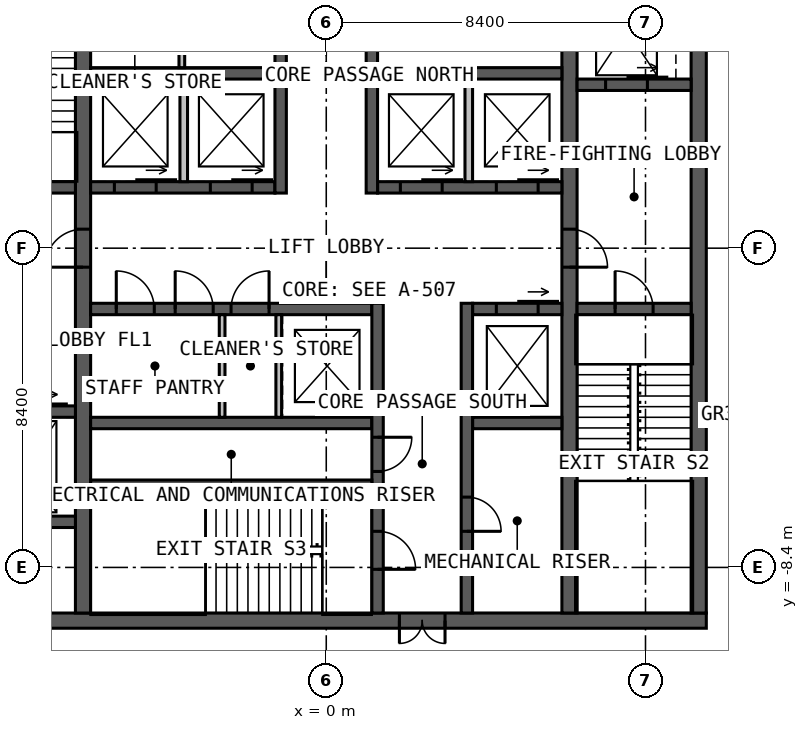
"""IFC4 building model, lengths in metres.
Left out: names, types, materials, properties, quantities, classifications, styles, units other than length and angle.
Written with IfcOpenShell. Run it as: python <this file> out.ifc"""

import sys

from ifc_helpers import new_model, si_unit, direction, frame, frame_2d, origin, place, context, subcontext, project, spatial, rectangle, extrude, element, fill, save


model = new_model("IFC4")
c1 = context("Model", 3, precision=1e-05, world=origin(), true_north=direction((0.0, 1.0)))
c2 = subcontext(c1, "Body", "Model", "MODEL_VIEW")
j1 = project(units=[si_unit("LENGTHUNIT", "METRE"), si_unit("PLANEANGLEUNIT", "RADIAN")], contexts=[c1])
p1 = place(None, origin())
s1 = spatial("IfcSite", under=j1, at=p1, CompositionType="ELEMENT")
p2 = place(p1, origin())
s2 = spatial("IfcBuilding", under=s1, at=p2, CompositionType="ELEMENT")
p3 = place(p2, frame((0.0, 0.0, 264.0)))
s3 = spatial("IfcBuildingStorey", under=s2, at=p3, CompositionType="ELEMENT", Elevation=264.0)
p4 = place(p3, frame((10.0, -9.8, 0.0), z_axis=(0.0, 0.0, 1.0), x_axis=(-1.0, 0.0, 0.0)))
e1 = element("IfcWall", 1, at=p4, inside=s3, PredefinedType="SOLIDWALL", context=c2, shape_type="SweptSolid", body=[
    extrude(rectangle(XDim=20.0, YDim=0.4, at=frame_2d((10.0, 0.0))), origin(), (0.0, 0.0, 1.0), 4.0),
])
p5 = place(p4, frame((6.875, 0.0, 0.0)))
e2 = element("IfcOpeningElement", 2, at=p5, cuts=e1, PredefinedType="OPENING", context=c2, shape_type="SweptSolid", body=[
    extrude(rectangle(XDim=1.2, YDim=2.2, at=frame_2d((0.6, 1.1))), frame((0.0, 0.21, 0.0), z_axis=(0.0, -1.0, 0.0), x_axis=(1.0, 0.0, 0.0)), (0.0, 0.0, 1.0), 0.42),
])
p6 = place(p3, frame((9.8, -9.6, 0.0), z_axis=(0.0, 0.0, 1.0), x_axis=(0.0, 1.0, 0.0)))
e3 = element("IfcWall", 3, at=p6, inside=s3, PredefinedType="SOLIDWALL", context=c2, shape_type="SweptSolid", body=[
    extrude(rectangle(XDim=19.2, YDim=0.4, at=frame_2d((9.6, 0.0))), origin(), (0.0, 0.0, 1.0), 4.0),
])
p7 = place(p3, frame((-6.4, -9.6, 0.0), z_axis=(0.0, 0.0, 1.0), x_axis=(0.0, 1.0, 0.0)))
e4 = element("IfcWall", 4, at=p7, inside=s3, PredefinedType="SOLIDWALL", context=c2, shape_type="SweptSolid", body=[
    extrude(rectangle(XDim=19.2, YDim=0.4, at=frame_2d((9.6, 0.0))), origin(), (0.0, 0.0, 1.0), 4.0),
])
p8 = place(p7, frame((9.1, 0.0, 0.0)))
e5 = element("IfcOpeningElement", 5, at=p8, cuts=e4, PredefinedType="OPENING", context=c2, shape_type="SweptSolid", body=[
    extrude(rectangle(XDim=1.0, YDim=2.2, at=frame_2d((0.5, 1.1))), frame((0.0, 0.21, 0.0), z_axis=(0.0, -1.0, 0.0), x_axis=(1.0, 0.0, 0.0)), (0.0, 0.0, 1.0), 0.42),
])
p9 = place(p3, frame((6.4, 9.6, 0.0), z_axis=(0.0, 0.0, 1.0), x_axis=(0.0, -1.0, 0.0)))
e6 = element("IfcWall", 6, at=p9, inside=s3, PredefinedType="SOLIDWALL", context=c2, shape_type="SweptSolid", body=[
    extrude(rectangle(XDim=19.2, YDim=0.4, at=frame_2d((9.6, 0.0))), origin(), (0.0, 0.0, 1.0), 4.0),
])
p10 = place(p9, frame((9.1, 0.0, 0.0)))
e7 = element("IfcOpeningElement", 7, at=p10, cuts=e6, PredefinedType="OPENING", context=c2, shape_type="SweptSolid", body=[
    extrude(rectangle(XDim=1.0, YDim=2.2, at=frame_2d((0.5, 1.1))), frame((0.0, 0.21, 0.0), z_axis=(0.0, -1.0, 0.0), x_axis=(1.0, 0.0, 0.0)), (0.0, 0.0, 1.0), 0.42),
])
p11 = place(p3, frame((-6.2, 1.6, 0.0), z_axis=(0.0, 0.0, 1.0), x_axis=(1.0, 0.0, 0.0)))
e8 = element("IfcWall", 8, at=p11, inside=s3, PredefinedType="SOLIDWALL", context=c2, shape_type="SweptSolid", body=[
    extrude(rectangle(XDim=4.85, YDim=0.3, at=frame_2d((2.425, 0.0))), origin(), (0.0, 0.0, 1.0), 4.0),
])
p12 = place(p11, frame((0.625, 0.0, 0.0)))
e9 = element("IfcOpeningElement", 9, at=p12, cuts=e8, PredefinedType="OPENING", context=c2, shape_type="SweptSolid", body=[
    extrude(rectangle(XDim=1.1, YDim=2.2, at=frame_2d((0.55, 1.1))), frame((0.0, 0.16, 0.0), z_axis=(0.0, -1.0, 0.0), x_axis=(1.0, 0.0, 0.0)), (0.0, 0.0, 1.0), 0.32),
])
p13 = place(p11, frame((3.15, 0.0, 0.0)))
e10 = element("IfcOpeningElement", 10, at=p13, cuts=e8, PredefinedType="OPENING", context=c2, shape_type="SweptSolid", body=[
    extrude(rectangle(XDim=1.1, YDim=2.2, at=frame_2d((0.55, 1.1))), frame((0.0, 0.16, 0.0), z_axis=(0.0, -1.0, 0.0), x_axis=(1.0, 0.0, 0.0)), (0.0, 0.0, 1.0), 0.32),
])
p14 = place(p3, frame((1.35, 1.6, 0.0), z_axis=(0.0, 0.0, 1.0), x_axis=(1.0, 0.0, 0.0)))
e11 = element("IfcWall", 11, at=p14, inside=s3, PredefinedType="SOLIDWALL", context=c2, shape_type="SweptSolid", body=[
    extrude(rectangle(XDim=4.85, YDim=0.3, at=frame_2d((2.425, 0.0))), origin(), (0.0, 0.0, 1.0), 4.0),
])
p15 = place(p14, frame((0.6, 0.0, 0.0)))
e12 = element("IfcOpeningElement", 12, at=p15, cuts=e11, PredefinedType="OPENING", context=c2, shape_type="SweptSolid", body=[
    extrude(rectangle(XDim=1.1, YDim=2.2, at=frame_2d((0.55, 1.1))), frame((0.0, 0.16, 0.0), z_axis=(0.0, -1.0, 0.0), x_axis=(1.0, 0.0, 0.0)), (0.0, 0.0, 1.0), 0.32),
])
p16 = place(p14, frame((3.125, 0.0, 0.0)))
e13 = element("IfcOpeningElement", 13, at=p16, cuts=e11, PredefinedType="OPENING", context=c2, shape_type="SweptSolid", body=[
    extrude(rectangle(XDim=1.1, YDim=2.2, at=frame_2d((0.55, 1.1))), frame((0.0, 0.16, 0.0), z_axis=(0.0, -1.0, 0.0), x_axis=(1.0, 0.0, 0.0)), (0.0, 0.0, 1.0), 0.32),
])
for number, where, z_axis, x_axis in (
    (14, (-6.2, 4.6, 0.0), (0.0, 0.0, 1.0), (1.0, 0.0, 0.0)),
    (15, (1.35, 4.6, 0.0), (0.0, 0.0, 1.0), (1.0, 0.0, 0.0)),
):
    element("IfcWall", number, at=place(p3, frame(where, z_axis=z_axis, x_axis=x_axis)), inside=s3, PredefinedType="SOLIDWALL", context=c2, shape_type="SweptSolid", body=[
        extrude(rectangle(XDim=4.85, YDim=0.3, at=frame_2d((2.425, 0.0))), origin(), (0.0, 0.0, 1.0), 4.0),
    ])
p17 = place(p3, frame((-1.2, 1.45, 0.0), z_axis=(0.0, 0.0, 1.0), x_axis=(0.0, 1.0, 0.0)))
e16 = element("IfcWall", 16, at=p17, inside=s3, PredefinedType="SOLIDWALL", context=c2, shape_type="SweptSolid", body=[
    extrude(rectangle(XDim=8.15, YDim=0.3, at=frame_2d((4.075, 0.0))), origin(), (0.0, 0.0, 1.0), 4.0),
])
p18 = place(p17, frame((5.05, 0.0, 0.0)))
e17 = element("IfcOpeningElement", 17, at=p18, cuts=e16, PredefinedType="OPENING", context=c2, shape_type="SweptSolid", body=[
    extrude(rectangle(XDim=1.0, YDim=2.2, at=frame_2d((0.5, 1.1))), frame((0.0, 0.16, 0.0), z_axis=(0.0, -1.0, 0.0), x_axis=(1.0, 0.0, 0.0)), (0.0, 0.0, 1.0), 0.32),
])
p19 = place(p3, frame((1.2, 1.45, 0.0), z_axis=(0.0, 0.0, 1.0), x_axis=(0.0, 1.0, 0.0)))
e18 = element("IfcWall", 18, at=p19, inside=s3, PredefinedType="SOLIDWALL", context=c2, shape_type="SweptSolid", body=[
    extrude(rectangle(XDim=8.15, YDim=0.3, at=frame_2d((4.075, 0.0))), origin(), (0.0, 0.0, 1.0), 4.0),
])
p20 = place(p19, frame((3.8, 0.0, 0.0)))
e19 = element("IfcOpeningElement", 19, at=p20, cuts=e18, PredefinedType="OPENING", context=c2, shape_type="SweptSolid", body=[
    extrude(rectangle(XDim=1.0, YDim=2.2, at=frame_2d((0.5, 1.1))), frame((0.0, 0.16, 0.0), z_axis=(0.0, -1.0, 0.0), x_axis=(1.0, 0.0, 0.0)), (0.0, 0.0, 1.0), 0.32),
])
p21 = place(p19, frame((6.15, 0.0, 0.0)))
e20 = element("IfcOpeningElement", 20, at=p21, cuts=e18, PredefinedType="OPENING", context=c2, shape_type="SweptSolid", body=[
    extrude(rectangle(XDim=1.0, YDim=2.2, at=frame_2d((0.5, 1.1))), frame((0.0, 0.16, 0.0), z_axis=(0.0, -1.0, 0.0), x_axis=(1.0, 0.0, 0.0)), (0.0, 0.0, 1.0), 0.32),
])
p22 = place(p3, frame((-6.2, -1.6, 0.0), z_axis=(0.0, 0.0, 1.0), x_axis=(1.0, 0.0, 0.0)))
e21 = element("IfcWall", 21, at=p22, inside=s3, PredefinedType="SOLIDWALL", context=c2, shape_type="SweptSolid", body=[
    extrude(rectangle(XDim=7.4, YDim=0.3, at=frame_2d((3.7, 0.0))), origin(), (0.0, 0.0, 1.0), 4.0),
])
p23 = place(p22, frame((0.675, 0.0, 0.0)))
e22 = element("IfcOpeningElement", 22, at=p23, cuts=e21, PredefinedType="OPENING", context=c2, shape_type="SweptSolid", body=[
    extrude(rectangle(XDim=1.0, YDim=2.2, at=frame_2d((0.5, 1.1))), frame((0.0, 0.16, 0.0), z_axis=(0.0, -1.0, 0.0), x_axis=(1.0, 0.0, 0.0)), (0.0, 0.0, 1.0), 0.32),
])
p24 = place(p22, frame((2.225, 0.0, 0.0)))
e23 = element("IfcOpeningElement", 23, at=p24, cuts=e21, PredefinedType="OPENING", context=c2, shape_type="SweptSolid", body=[
    extrude(rectangle(XDim=1.0, YDim=2.2, at=frame_2d((0.5, 1.1))), frame((0.0, 0.16, 0.0), z_axis=(0.0, -1.0, 0.0), x_axis=(1.0, 0.0, 0.0)), (0.0, 0.0, 1.0), 0.32),
])
p25 = place(p22, frame((3.695, 0.0, 0.0)))
e24 = element("IfcOpeningElement", 24, at=p25, cuts=e21, PredefinedType="OPENING", context=c2, shape_type="SweptSolid", body=[
    extrude(rectangle(XDim=1.0, YDim=2.2, at=frame_2d((0.5, 1.1))), frame((0.0, 0.16, 0.0), z_axis=(0.0, -1.0, 0.0), x_axis=(1.0, 0.0, 0.0)), (0.0, 0.0, 1.0), 0.32),
])
p26 = place(p3, frame((3.85, -1.6, 0.0), z_axis=(0.0, 0.0, 1.0), x_axis=(1.0, 0.0, 0.0)))
e25 = element("IfcWall", 25, at=p26, inside=s3, PredefinedType="SOLIDWALL", context=c2, shape_type="SweptSolid", body=[
    extrude(rectangle(XDim=2.35, YDim=0.3, at=frame_2d((1.175, 0.0))), origin(), (0.0, 0.0, 1.0), 4.0),
])
p27 = place(p26, frame((0.625, 0.0, 0.0)))
e26 = element("IfcOpeningElement", 26, at=p27, cuts=e25, PredefinedType="OPENING", context=c2, shape_type="SweptSolid", body=[
    extrude(rectangle(XDim=1.1, YDim=2.2, at=frame_2d((0.55, 1.1))), frame((0.0, 0.16, 0.0), z_axis=(0.0, -1.0, 0.0), x_axis=(1.0, 0.0, 0.0)), (0.0, 0.0, 1.0), 0.32),
])
p28 = place(p3, frame((-6.2, -4.6, 0.0), z_axis=(0.0, 0.0, 1.0), x_axis=(1.0, 0.0, 0.0)))
e27 = element("IfcWall", 27, at=p28, inside=s3, PredefinedType="SOLIDWALL", context=c2, shape_type="SweptSolid", body=[
    extrude(rectangle(XDim=7.4, YDim=0.3, at=frame_2d((3.7, 0.0))), origin(), (0.0, 0.0, 1.0), 4.0),
])
p29 = place(p3, frame((3.85, -4.6, 0.0), z_axis=(0.0, 0.0, 1.0), x_axis=(1.0, 0.0, 0.0)))
e28 = element("IfcWall", 28, at=p29, inside=s3, PredefinedType="SOLIDWALL", context=c2, shape_type="SweptSolid", body=[
    extrude(rectangle(XDim=2.35, YDim=0.3, at=frame_2d((1.175, 0.0))), origin(), (0.0, 0.0, 1.0), 4.0),
])
p30 = place(p3, frame((1.35, -1.45, 0.0), z_axis=(0.0, 0.0, 1.0), x_axis=(0.0, -1.0, 0.0)))
e29 = element("IfcWall", 29, at=p30, inside=s3, PredefinedType="SOLIDWALL", context=c2, shape_type="SweptSolid", body=[
    extrude(rectangle(XDim=8.15, YDim=0.3, at=frame_2d((4.075, 0.0))), origin(), (0.0, 0.0, 1.0), 4.0),
])
p31 = place(p30, frame((6.0, 0.0, 0.0)))
e30 = element("IfcOpeningElement", 30, at=p31, cuts=e29, PredefinedType="OPENING", context=c2, shape_type="SweptSolid", body=[
    extrude(rectangle(XDim=1.0, YDim=2.2, at=frame_2d((0.5, 1.1))), frame((0.0, 0.16, 0.0), z_axis=(0.0, -1.0, 0.0), x_axis=(1.0, 0.0, 0.0)), (0.0, 0.0, 1.0), 0.32),
])
p32 = place(p30, frame((3.525, 0.0, 0.0)))
e31 = element("IfcOpeningElement", 31, at=p32, cuts=e29, PredefinedType="OPENING", context=c2, shape_type="SweptSolid", body=[
    extrude(rectangle(XDim=0.9, YDim=2.2, at=frame_2d((0.45, 1.1))), frame((0.0, 0.16, 0.0), z_axis=(0.0, -1.0, 0.0), x_axis=(1.0, 0.0, 0.0)), (0.0, 0.0, 1.0), 0.32),
])
p33 = place(p3, frame((3.7, -1.45, 0.0), z_axis=(0.0, 0.0, 1.0), x_axis=(0.0, -1.0, 0.0)))
e32 = element("IfcWall", 32, at=p33, inside=s3, PredefinedType="SOLIDWALL", context=c2, shape_type="SweptSolid", body=[
    extrude(rectangle(XDim=8.15, YDim=0.3, at=frame_2d((4.075, 0.0))), origin(), (0.0, 0.0, 1.0), 4.0),
])
p34 = place(p33, frame((5.1, 0.0, 0.0)))
e33 = element("IfcOpeningElement", 33, at=p34, cuts=e32, PredefinedType="OPENING", context=c2, shape_type="SweptSolid", body=[
    extrude(rectangle(XDim=0.9, YDim=2.2, at=frame_2d((0.45, 1.1))), frame((0.0, 0.16, 0.0), z_axis=(0.0, -1.0, 0.0), x_axis=(1.0, 0.0, 0.0)), (0.0, 0.0, 1.0), 0.32),
])
p35 = place(p3, frame((-6.2, -6.2, 0.0), z_axis=(0.0, 0.0, 1.0), x_axis=(1.0, 0.0, 0.0)))
e34 = element("IfcWall", 34, at=p35, inside=s3, PredefinedType="SOLIDWALL", context=c2, shape_type="SweptSolid", body=[
    extrude(rectangle(XDim=7.4, YDim=0.2, at=frame_2d((3.7, 0.0))), origin(), (0.0, 0.0, 1.0), 4.0),
])
p36 = place(p3, frame((-9.6, 1.6, 0.0), z_axis=(0.0, 0.0, 1.0), x_axis=(1.0, 0.0, 0.0)))
e35 = element("IfcWall", 35, at=p36, inside=s3, PredefinedType="SOLIDWALL", context=c2, shape_type="SweptSolid", body=[
    extrude(rectangle(XDim=3.0, YDim=0.3, at=frame_2d((1.5, 0.0))), origin(), (0.0, 0.0, 1.0), 4.0),
])
p37 = place(p36, frame((1.0, 0.0, 0.0)))
e36 = element("IfcOpeningElement", 36, at=p37, cuts=e35, PredefinedType="OPENING", context=c2, shape_type="SweptSolid", body=[
    extrude(rectangle(XDim=1.0, YDim=2.2, at=frame_2d((0.5, 1.1))), frame((0.0, 0.16, 0.0), z_axis=(0.0, -1.0, 0.0), x_axis=(1.0, 0.0, 0.0)), (0.0, 0.0, 1.0), 0.32),
])
p38 = place(p3, frame((6.6, -1.6, 0.0), z_axis=(0.0, 0.0, 1.0), x_axis=(1.0, 0.0, 0.0)))
e37 = element("IfcWall", 37, at=p38, inside=s3, PredefinedType="SOLIDWALL", context=c2, shape_type="SweptSolid", body=[
    extrude(rectangle(XDim=3.0, YDim=0.3, at=frame_2d((1.5, 0.0))), origin(), (0.0, 0.0, 1.0), 4.0),
])
p39 = place(p38, frame((1.0, 0.0, 0.0)))
e38 = element("IfcOpeningElement", 38, at=p39, cuts=e37, PredefinedType="OPENING", context=c2, shape_type="SweptSolid", body=[
    extrude(rectangle(XDim=1.0, YDim=2.2, at=frame_2d((0.5, 1.1))), frame((0.0, 0.16, 0.0), z_axis=(0.0, -1.0, 0.0), x_axis=(1.0, 0.0, 0.0)), (0.0, 0.0, 1.0), 0.32),
])
p40 = place(p3, frame((-9.6, -4.3, 0.0), z_axis=(0.0, 0.0, 1.0), x_axis=(1.0, 0.0, 0.0)))
e39 = element("IfcWall", 39, at=p40, inside=s3, PredefinedType="SOLIDWALL", context=c2, shape_type="SweptSolid", body=[
    extrude(rectangle(XDim=3.0, YDim=0.3, at=frame_2d((1.5, 0.0))), origin(), (0.0, 0.0, 1.0), 4.0),
])
p41 = place(p40, frame((1.15, 0.0, 0.0)))
e40 = element("IfcOpeningElement", 40, at=p41, cuts=e39, PredefinedType="OPENING", context=c2, shape_type="SweptSolid", body=[
    extrude(rectangle(XDim=1.1, YDim=2.2, at=frame_2d((0.55, 1.1))), frame((0.0, 0.16, 0.0), z_axis=(0.0, -1.0, 0.0), x_axis=(1.0, 0.0, 0.0)), (0.0, 0.0, 1.0), 0.32),
])
p42 = place(p3, frame((6.6, 4.3, 0.0), z_axis=(0.0, 0.0, 1.0), x_axis=(1.0, 0.0, 0.0)))
e41 = element("IfcWall", 41, at=p42, inside=s3, PredefinedType="SOLIDWALL", context=c2, shape_type="SweptSolid", body=[
    extrude(rectangle(XDim=3.0, YDim=0.3, at=frame_2d((1.5, 0.0))), origin(), (0.0, 0.0, 1.0), 4.0),
])
p43 = place(p42, frame((0.75, 0.0, 0.0)))
e42 = element("IfcOpeningElement", 42, at=p43, cuts=e41, PredefinedType="OPENING", context=c2, shape_type="SweptSolid", body=[
    extrude(rectangle(XDim=1.1, YDim=2.2, at=frame_2d((0.55, 1.1))), frame((0.0, 0.16, 0.0), z_axis=(0.0, -1.0, 0.0), x_axis=(1.0, 0.0, 0.0)), (0.0, 0.0, 1.0), 0.32),
])
p44 = place(p3, frame((-9.6, -7.2, 0.0), z_axis=(0.0, 0.0, 1.0), x_axis=(1.0, 0.0, 0.0)))
e43 = element("IfcWall", 43, at=p44, inside=s3, PredefinedType="SOLIDWALL", context=c2, shape_type="SweptSolid", body=[
    extrude(rectangle(XDim=3.0, YDim=0.3, at=frame_2d((1.5, 0.0))), origin(), (0.0, 0.0, 1.0), 4.0),
])
for number, where, z_axis, x_axis in (
    (44, (-3.75, 1.75, 0.0), (0.0, 0.0, 1.0), (0.0, 1.0, 0.0)),
    (45, (3.75, 1.75, 0.0), (0.0, 0.0, 1.0), (0.0, 1.0, 0.0)),
):
    element("IfcWall", number, at=place(p3, frame(where, z_axis=z_axis, x_axis=x_axis)), inside=s3, PredefinedType="SOLIDWALL", context=c2, shape_type="SweptSolid", body=[
        extrude(rectangle(XDim=2.7, YDim=0.2, at=frame_2d((1.35, 0.0))), origin(), (0.0, 0.0, 1.0), 3.75),
    ])
p45 = place(p3, frame((-3.8, 4.75, 0.0), z_axis=(0.0, 0.0, 1.0), x_axis=(0.0, 1.0, 0.0)))
e46 = element("IfcWall", 46, at=p45, inside=s3, PredefinedType="PARTITIONING", context=c2, shape_type="SweptSolid", body=[
    extrude(rectangle(XDim=1.375, YDim=0.15, at=frame_2d((0.688, 0.0))), origin(), (0.0, 0.0, 1.0), 3.75),
])
for number, where, z_axis, x_axis in (
    (47, (-2.74, -1.75, 0.0), (0.0, 0.0, 1.0), (0.0, -1.0, 0.0)),
    (48, (-1.25, -1.75, 0.0), (0.0, 0.0, 1.0), (0.0, -1.0, 0.0)),
):
    element("IfcWall", number, at=place(p3, frame(where, z_axis=z_axis, x_axis=x_axis)), inside=s3, PredefinedType="PARTITIONING", context=c2, shape_type="SweptSolid", body=[
        extrude(rectangle(XDim=2.7, YDim=0.15, at=frame_2d((1.35, 0.0))), origin(), (0.0, 0.0, 1.0), 3.75),
    ])
p46 = place(p5, origin())
e49 = element("IfcDoor", 49, at=p46, inside=s3, OperationType="DOUBLE_DOOR_SINGLE_SWING", PredefinedType="DOOR", context=c2, shape_type="SweptSolid", body=[
    extrude(rectangle(XDim=1.2, YDim=2.2, at=frame_2d((0.6, 1.1))), frame((0.0, 0.025, 0.0), z_axis=(0.0, -1.0, 0.0), x_axis=(1.0, 0.0, 0.0)), (0.0, 0.0, 1.0), 0.05),
])
fill(e2, e49)
p47 = place(p8, origin())
e50 = element("IfcDoor", 50, at=p47, inside=s3, OperationType="SINGLE_SWING_LEFT", PredefinedType="DOOR", context=c2, shape_type="SweptSolid", body=[
    extrude(rectangle(XDim=1.0, YDim=2.2, at=frame_2d((0.5, 1.1))), frame((0.0, 0.025, 0.0), z_axis=(0.0, -1.0, 0.0), x_axis=(1.0, 0.0, 0.0)), (0.0, 0.0, 1.0), 0.05),
])
fill(e5, e50)
p48 = place(p10, origin())
e51 = element("IfcDoor", 51, at=p48, inside=s3, OperationType="SINGLE_SWING_RIGHT", PredefinedType="DOOR", context=c2, shape_type="SweptSolid", body=[
    extrude(rectangle(XDim=1.0, YDim=2.2, at=frame_2d((0.5, 1.1))), frame((0.0, 0.025, 0.0), z_axis=(0.0, -1.0, 0.0), x_axis=(1.0, 0.0, 0.0)), (0.0, 0.0, 1.0), 0.05),
])
fill(e7, e51)
p49 = place(p39, origin())
e52 = element("IfcDoor", 52, at=p49, inside=s3, OperationType="SINGLE_SWING_LEFT", PredefinedType="DOOR", context=c2, shape_type="SweptSolid", body=[
    extrude(rectangle(XDim=1.0, YDim=2.2, at=frame_2d((0.5, 1.1))), frame((0.0, 0.025, 0.0), z_axis=(0.0, -1.0, 0.0), x_axis=(1.0, 0.0, 0.0)), (0.0, 0.0, 1.0), 0.05),
])
fill(e38, e52)
p50 = place(p31, origin())
e53 = element("IfcDoor", 53, at=p50, inside=s3, OperationType="SINGLE_SWING_RIGHT", PredefinedType="DOOR", context=c2, shape_type="SweptSolid", body=[
    extrude(rectangle(XDim=1.0, YDim=2.2, at=frame_2d((0.5, 1.1))), frame((0.0, 0.025, 0.0), z_axis=(0.0, -1.0, 0.0), x_axis=(1.0, 0.0, 0.0)), (0.0, 0.0, 1.0), 0.05),
])
fill(e30, e53)
p51 = place(p32, origin())
e54 = element("IfcDoor", 54, at=p51, inside=s3, OperationType="SINGLE_SWING_LEFT", PredefinedType="DOOR", context=c2, shape_type="SweptSolid", body=[
    extrude(rectangle(XDim=0.9, YDim=2.2, at=frame_2d((0.45, 1.1))), frame((0.0, 0.025, 0.0), z_axis=(0.0, -1.0, 0.0), x_axis=(1.0, 0.0, 0.0)), (0.0, 0.0, 1.0), 0.05),
])
fill(e31, e54)
p52 = place(p34, origin())
e55 = element("IfcDoor", 55, at=p52, inside=s3, OperationType="SINGLE_SWING_RIGHT", PredefinedType="DOOR", context=c2, shape_type="SweptSolid", body=[
    extrude(rectangle(XDim=0.9, YDim=2.2, at=frame_2d((0.45, 1.1))), frame((0.0, 0.025, 0.0), z_axis=(0.0, -1.0, 0.0), x_axis=(1.0, 0.0, 0.0)), (0.0, 0.0, 1.0), 0.05),
])
fill(e33, e55)
p53 = place(p23, origin())
e56 = element("IfcDoor", 56, at=p53, inside=s3, OperationType="SINGLE_SWING_LEFT", PredefinedType="DOOR", context=c2, shape_type="SweptSolid", body=[
    extrude(rectangle(XDim=1.0, YDim=2.2, at=frame_2d((0.5, 1.1))), frame((0.0, 0.025, 0.0), z_axis=(0.0, -1.0, 0.0), x_axis=(1.0, 0.0, 0.0)), (0.0, 0.0, 1.0), 0.05),
])
fill(e22, e56)
p54 = place(p24, origin())
e57 = element("IfcDoor", 57, at=p54, inside=s3, OperationType="SINGLE_SWING_LEFT", PredefinedType="DOOR", context=c2, shape_type="SweptSolid", body=[
    extrude(rectangle(XDim=1.0, YDim=2.2, at=frame_2d((0.5, 1.1))), frame((0.0, 0.025, 0.0), z_axis=(0.0, -1.0, 0.0), x_axis=(1.0, 0.0, 0.0)), (0.0, 0.0, 1.0), 0.05),
])
fill(e23, e57)
p55 = place(p25, origin())
e58 = element("IfcDoor", 58, at=p55, inside=s3, OperationType="SINGLE_SWING_RIGHT", PredefinedType="DOOR", context=c2, shape_type="SweptSolid", body=[
    extrude(rectangle(XDim=1.0, YDim=2.2, at=frame_2d((0.5, 1.1))), frame((0.0, 0.025, 0.0), z_axis=(0.0, -1.0, 0.0), x_axis=(1.0, 0.0, 0.0)), (0.0, 0.0, 1.0), 0.05),
])
fill(e24, e58)
p56 = place(p12, origin())
e59 = element("IfcDoor", 59, at=p56, inside=s3, OperationType="SLIDING_TO_LEFT", PredefinedType="DOOR", context=c2, shape_type="SweptSolid", body=[
    extrude(rectangle(XDim=1.1, YDim=2.2, at=frame_2d((0.55, 1.1))), frame((0.0, 0.025, 0.0), z_axis=(0.0, -1.0, 0.0), x_axis=(1.0, 0.0, 0.0)), (0.0, 0.0, 1.0), 0.05),
])
fill(e9, e59)
p57 = place(p13, origin())
e60 = element("IfcDoor", 60, at=p57, inside=s3, OperationType="SLIDING_TO_LEFT", PredefinedType="DOOR", context=c2, shape_type="SweptSolid", body=[
    extrude(rectangle(XDim=1.1, YDim=2.2, at=frame_2d((0.55, 1.1))), frame((0.0, 0.025, 0.0), z_axis=(0.0, -1.0, 0.0), x_axis=(1.0, 0.0, 0.0)), (0.0, 0.0, 1.0), 0.05),
])
fill(e10, e60)
p58 = place(p15, origin())
e61 = element("IfcDoor", 61, at=p58, inside=s3, OperationType="SLIDING_TO_LEFT", PredefinedType="DOOR", context=c2, shape_type="SweptSolid", body=[
    extrude(rectangle(XDim=1.1, YDim=2.2, at=frame_2d((0.55, 1.1))), frame((0.0, 0.025, 0.0), z_axis=(0.0, -1.0, 0.0), x_axis=(1.0, 0.0, 0.0)), (0.0, 0.0, 1.0), 0.05),
])
fill(e12, e61)
p59 = place(p16, origin())
e62 = element("IfcDoor", 62, at=p59, inside=s3, OperationType="SLIDING_TO_LEFT", PredefinedType="DOOR", context=c2, shape_type="SweptSolid", body=[
    extrude(rectangle(XDim=1.1, YDim=2.2, at=frame_2d((0.55, 1.1))), frame((0.0, 0.025, 0.0), z_axis=(0.0, -1.0, 0.0), x_axis=(1.0, 0.0, 0.0)), (0.0, 0.0, 1.0), 0.05),
])
fill(e13, e62)
p60 = place(p27, origin())
e63 = element("IfcDoor", 63, at=p60, inside=s3, OperationType="SLIDING_TO_LEFT", PredefinedType="DOOR", context=c2, shape_type="SweptSolid", body=[
    extrude(rectangle(XDim=1.1, YDim=2.2, at=frame_2d((0.55, 1.1))), frame((0.0, 0.025, 0.0), z_axis=(0.0, -1.0, 0.0), x_axis=(1.0, 0.0, 0.0)), (0.0, 0.0, 1.0), 0.05),
])
fill(e26, e63)
p61 = place(p43, origin())
e64 = element("IfcDoor", 64, at=p61, inside=s3, OperationType="SLIDING_TO_LEFT", PredefinedType="DOOR", context=c2, shape_type="SweptSolid", body=[
    extrude(rectangle(XDim=1.1, YDim=2.2, at=frame_2d((0.55, 1.1))), frame((0.0, 0.025, 0.0), z_axis=(0.0, -1.0, 0.0), x_axis=(1.0, 0.0, 0.0)), (0.0, 0.0, 1.0), 0.05),
])
fill(e42, e64)
save(model, sys.argv[1])
